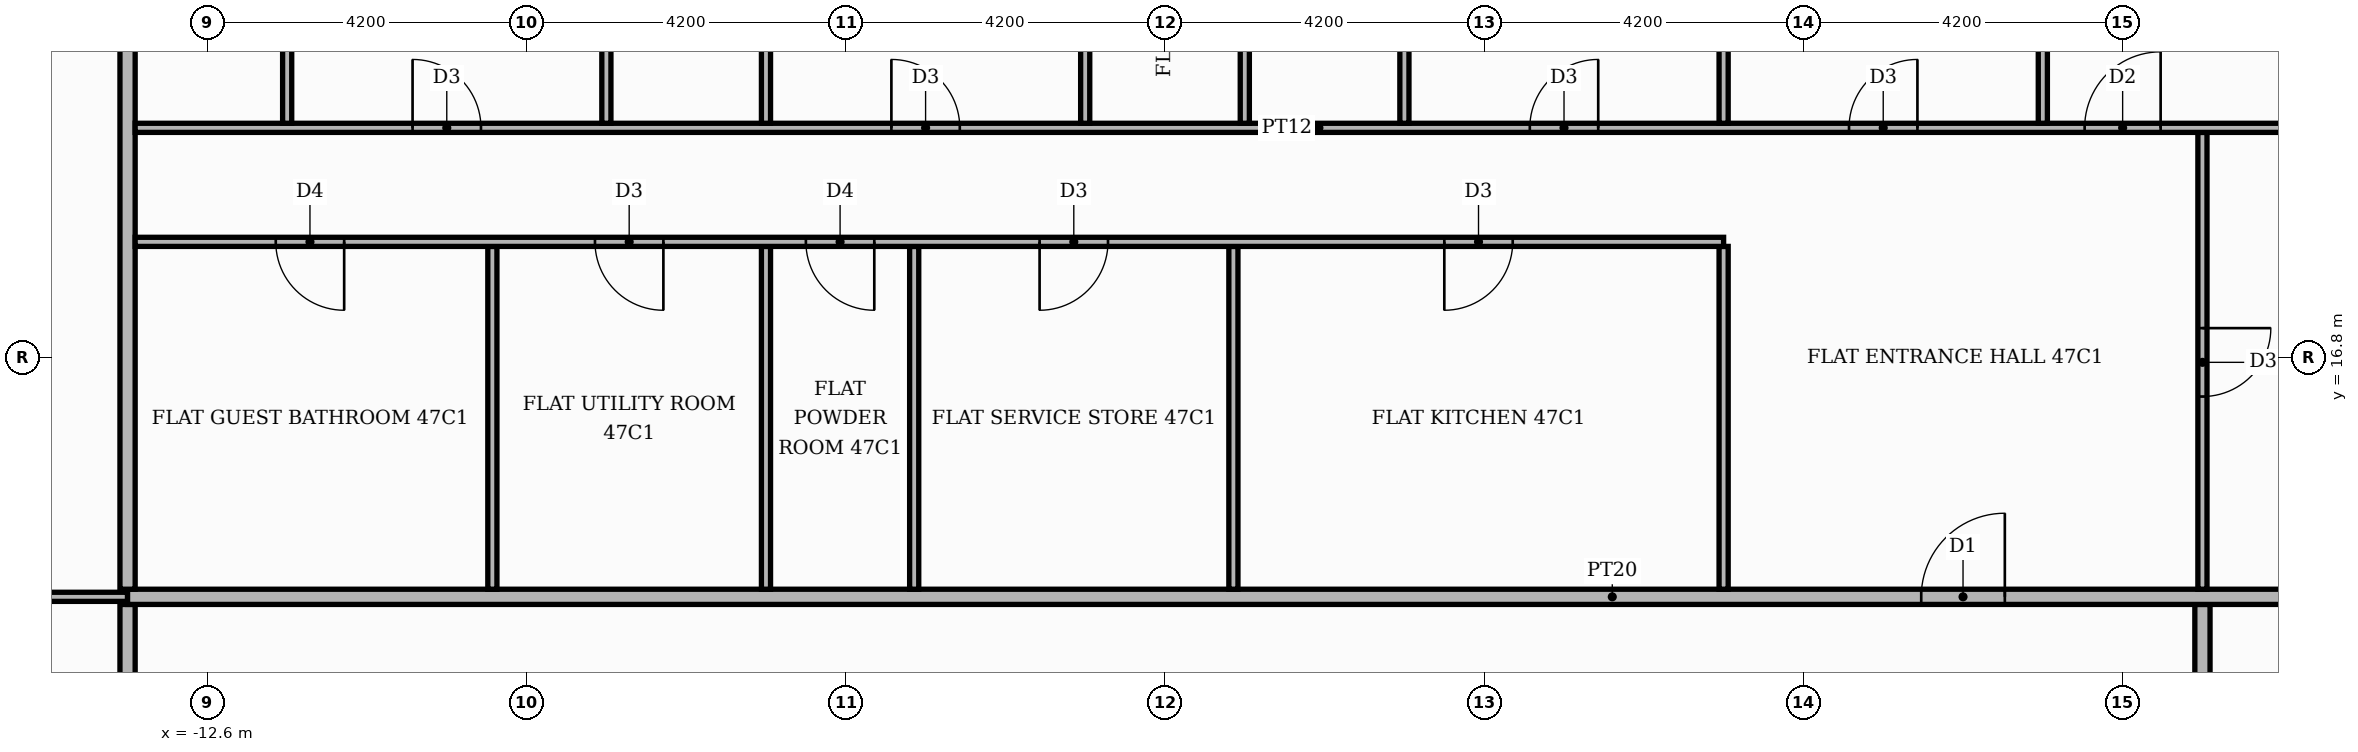
"""IFC4 building model, lengths in metres.
Left out: names, types, materials, properties, quantities, classifications, styles, units other than length and angle.
Written with IfcOpenShell. Run it as: python <this file> out.ifc"""

import sys

from ifc_helpers import new_model, si_unit, direction, frame, frame_2d, origin, place, context, subcontext, project, spatial, rectangle, extrude, element, fill, save


model = new_model("IFC4")
c1 = context("Model", 3, precision=1e-05, world=origin(), true_north=direction((0.0, 1.0)))
c2 = subcontext(c1, "Body", "Model", "MODEL_VIEW")
j1 = project(units=[si_unit("LENGTHUNIT", "METRE"), si_unit("PLANEANGLEUNIT", "RADIAN")], contexts=[c1])
p1 = place(None, origin())
s1 = spatial("IfcSite", under=j1, at=p1, CompositionType="ELEMENT")
p2 = place(p1, origin())
s2 = spatial("IfcBuilding", under=s1, at=p2, CompositionType="ELEMENT")
p3 = place(p2, frame((0.0, 0.0, 200.1)))
s3 = spatial("IfcBuildingStorey", under=s2, at=p3, CompositionType="ELEMENT", Elevation=200.1)
p4 = place(p3, frame((-13.65, -13.55, 0.0), z_axis=(0.0, 0.0, 1.0), x_axis=(0.0, 1.0, 0.0)))
e1 = element("IfcWall", 1, at=p4, inside=s3, PredefinedType="PARTITIONING", context=c2, shape_type="SweptSolid", body=[
    extrude(rectangle(XDim=27.1, YDim=0.2, at=frame_2d((13.55, 0.0))), origin(), (0.0, 0.0, 1.0), 3.48),
])
p5 = place(p4, frame((23.5, 0.0, 0.0)))
e2 = element("IfcOpeningElement", 2, at=p5, cuts=e1, PredefinedType="OPENING", context=c2, shape_type="SweptSolid", body=[
    extrude(rectangle(XDim=1.1, YDim=2.4, at=frame_2d((0.55, 1.2))), frame((0.0, 0.11, 0.0), z_axis=(0.0, -1.0, 0.0), x_axis=(1.0, 0.0, 0.0)), (0.0, 0.0, 1.0), 0.22),
])
p6 = place(p3, frame((13.65, 11.1, 0.0), z_axis=(0.0, 0.0, 1.0), x_axis=(0.0, 1.0, 0.0)))
e3 = element("IfcWall", 3, at=p6, inside=s3, PredefinedType="PARTITIONING", context=c2, shape_type="SweptSolid", body=[
    extrude(rectangle(XDim=2.45, YDim=0.2, at=frame_2d((1.225, 0.0))), origin(), (0.0, 0.0, 1.0), 3.48),
])
p7 = place(p3, frame((-20.12, 13.65, 0.0), z_axis=(0.0, 0.0, 1.0), x_axis=(1.0, 0.0, 0.0)))
e4 = element("IfcWall", 4, at=p7, inside=s3, PredefinedType="PARTITIONING", context=c2, shape_type="SweptSolid", body=[
    extrude(rectangle(XDim=6.47, YDim=0.12, at=frame_2d((3.235, 0.0))), origin(), (0.0, 0.0, 1.0), 3.48),
])
p8 = place(p7, frame((2.785, 0.0, 0.0)))
e5 = element("IfcOpeningElement", 5, at=p8, cuts=e4, PredefinedType="OPENING", context=c2, shape_type="SweptSolid", body=[
    extrude(rectangle(XDim=0.9, YDim=2.1, at=frame_2d((0.45, 1.05))), frame((0.0, 0.07, 0.0), z_axis=(0.0, -1.0, 0.0), x_axis=(1.0, 0.0, 0.0)), (0.0, 0.0, 1.0), 0.14),
])
p9 = place(p3, frame((-13.65, 13.65, 0.0), z_axis=(0.0, 0.0, 1.0), x_axis=(1.0, 0.0, 0.0)))
e6 = element("IfcWall", 6, at=p9, inside=s3, PredefinedType="PARTITIONING", context=c2, shape_type="SweptSolid", body=[
    extrude(rectangle(XDim=39.07, YDim=0.2, at=frame_2d((19.535, 0.0))), origin(), (0.0, 0.0, 1.0), 3.48),
])
p10 = place(p9, frame((23.6, 0.0, 0.0)))
e7 = element("IfcOpeningElement", 7, at=p10, cuts=e6, PredefinedType="OPENING", context=c2, shape_type="SweptSolid", body=[
    extrude(rectangle(XDim=1.1, YDim=2.4, at=frame_2d((0.55, 1.2))), frame((0.0, 0.11, 0.0), z_axis=(0.0, -1.0, 0.0), x_axis=(1.0, 0.0, 0.0)), (0.0, 0.0, 1.0), 0.22),
])
p11 = place(p3, frame((-13.65, 13.75, 0.0), z_axis=(0.0, 0.0, 1.0), x_axis=(0.0, 1.0, 0.0)))
e8 = element("IfcWall", 8, at=p11, inside=s3, PredefinedType="PARTITIONING", context=c2, shape_type="SweptSolid", body=[
    extrude(rectangle(XDim=11.67, YDim=0.2, at=frame_2d((5.835, 0.0))), origin(), (0.0, 0.0, 1.0), 3.48),
])
for number, where, z_axis, x_axis in (
    (9, (-8.85, 13.75, 0.0), (0.0, 0.0, 1.0), (0.0, 1.0, 0.0)),
    (10, (-5.25, 13.75, 0.0), (0.0, 0.0, 1.0), (0.0, 1.0, 0.0)),
    (11, (-3.3, 13.75, 0.0), (0.0, 0.0, 1.0), (0.0, 1.0, 0.0)),
    (12, (0.9, 13.75, 0.0), (0.0, 0.0, 1.0), (0.0, 1.0, 0.0)),
    (13, (7.35, 13.75, 0.0), (0.0, 0.0, 1.0), (0.0, 1.0, 0.0)),
):
    element("IfcWall", number, at=place(p3, frame(where, z_axis=z_axis, x_axis=x_axis)), inside=s3, PredefinedType="PARTITIONING", context=c2, shape_type="SweptSolid", body=[
        extrude(rectangle(XDim=4.51, YDim=0.12, at=frame_2d((2.255, 0.0))), origin(), (0.0, 0.0, 1.0), 3.48),
    ])
p12 = place(p3, frame((13.65, 13.75, 0.0), z_axis=(0.0, 0.0, 1.0), x_axis=(0.0, 1.0, 0.0)))
e14 = element("IfcWall", 14, at=p12, inside=s3, PredefinedType="PARTITIONING", context=c2, shape_type="SweptSolid", body=[
    extrude(rectangle(XDim=6.01, YDim=0.12, at=frame_2d((3.005, 0.0))), origin(), (0.0, 0.0, 1.0), 3.48),
])
p13 = place(p12, frame((2.535, 0.0, 0.0)))
e15 = element("IfcOpeningElement", 15, at=p13, cuts=e14, PredefinedType="OPENING", context=c2, shape_type="SweptSolid", body=[
    extrude(rectangle(XDim=0.9, YDim=2.1, at=frame_2d((0.45, 1.05))), frame((0.0, 0.07, 0.0), z_axis=(0.0, -1.0, 0.0), x_axis=(1.0, 0.0, 0.0)), (0.0, 0.0, 1.0), 0.14),
])
p14 = place(p3, frame((-13.55, 18.32, 0.0), z_axis=(0.0, 0.0, 1.0), x_axis=(1.0, 0.0, 0.0)))
e16 = element("IfcWall", 16, at=p14, inside=s3, PredefinedType="PARTITIONING", context=c2, shape_type="SweptSolid", body=[
    extrude(rectangle(XDim=20.9, YDim=0.12, at=frame_2d((10.45, 0.0))), origin(), (0.0, 0.0, 1.0), 3.48),
])
p15 = place(p14, frame((17.225, 0.0, 0.0)))
e17 = element("IfcOpeningElement", 17, at=p15, cuts=e16, PredefinedType="OPENING", context=c2, shape_type="SweptSolid", body=[
    extrude(rectangle(XDim=0.9, YDim=2.1, at=frame_2d((0.45, 1.05))), frame((0.0, 0.07, 0.0), z_axis=(0.0, -1.0, 0.0), x_axis=(1.0, 0.0, 0.0)), (0.0, 0.0, 1.0), 0.14),
])
p16 = place(p14, frame((11.9, 0.0, 0.0)))
e18 = element("IfcOpeningElement", 18, at=p16, cuts=e16, PredefinedType="OPENING", context=c2, shape_type="SweptSolid", body=[
    extrude(rectangle(XDim=0.9, YDim=2.1, at=frame_2d((0.45, 1.05))), frame((0.0, 0.07, 0.0), z_axis=(0.0, -1.0, 0.0), x_axis=(1.0, 0.0, 0.0)), (0.0, 0.0, 1.0), 0.14),
])
p17 = place(p14, frame((8.825, 0.0, 0.0)))
e19 = element("IfcOpeningElement", 19, at=p17, cuts=e16, PredefinedType="OPENING", context=c2, shape_type="SweptSolid", body=[
    extrude(rectangle(XDim=0.9, YDim=2.1, at=frame_2d((0.45, 1.05))), frame((0.0, 0.07, 0.0), z_axis=(0.0, -1.0, 0.0), x_axis=(1.0, 0.0, 0.0)), (0.0, 0.0, 1.0), 0.14),
])
p18 = place(p14, frame((6.05, 0.0, 0.0)))
e20 = element("IfcOpeningElement", 20, at=p18, cuts=e16, PredefinedType="OPENING", context=c2, shape_type="SweptSolid", body=[
    extrude(rectangle(XDim=0.9, YDim=2.1, at=frame_2d((0.45, 1.05))), frame((0.0, 0.07, 0.0), z_axis=(0.0, -1.0, 0.0), x_axis=(1.0, 0.0, 0.0)), (0.0, 0.0, 1.0), 0.14),
])
p19 = place(p14, frame((1.85, 0.0, 0.0)))
e21 = element("IfcOpeningElement", 21, at=p19, cuts=e16, PredefinedType="OPENING", context=c2, shape_type="SweptSolid", body=[
    extrude(rectangle(XDim=0.9, YDim=2.1, at=frame_2d((0.45, 1.05))), frame((0.0, 0.07, 0.0), z_axis=(0.0, -1.0, 0.0), x_axis=(1.0, 0.0, 0.0)), (0.0, 0.0, 1.0), 0.14),
])
p20 = place(p3, frame((-13.55, 19.82, 0.0), z_axis=(0.0, 0.0, 1.0), x_axis=(1.0, 0.0, 0.0)))
e22 = element("IfcWall", 22, at=p20, inside=s3, PredefinedType="PARTITIONING", context=c2, shape_type="SweptSolid", body=[
    extrude(rectangle(XDim=31.15, YDim=0.12, at=frame_2d((15.575, 0.0))), origin(), (0.0, 0.0, 1.0), 3.48),
])
p21 = place(p20, frame((25.65, 0.0, 0.0)))
e23 = element("IfcOpeningElement", 23, at=p21, cuts=e22, PredefinedType="OPENING", context=c2, shape_type="SweptSolid", body=[
    extrude(rectangle(XDim=1.0, YDim=2.1, at=frame_2d((0.5, 1.05))), frame((0.0, 0.07, 0.0), z_axis=(0.0, -1.0, 0.0), x_axis=(1.0, 0.0, 0.0)), (0.0, 0.0, 1.0), 0.14),
])
p22 = place(p20, frame((22.55, 0.0, 0.0)))
e24 = element("IfcOpeningElement", 24, at=p22, cuts=e22, PredefinedType="OPENING", context=c2, shape_type="SweptSolid", body=[
    extrude(rectangle(XDim=0.9, YDim=2.1, at=frame_2d((0.45, 1.05))), frame((0.0, 0.07, 0.0), z_axis=(0.0, -1.0, 0.0), x_axis=(1.0, 0.0, 0.0)), (0.0, 0.0, 1.0), 0.14),
])
p23 = place(p20, frame((18.35, 0.0, 0.0)))
e25 = element("IfcOpeningElement", 25, at=p23, cuts=e22, PredefinedType="OPENING", context=c2, shape_type="SweptSolid", body=[
    extrude(rectangle(XDim=0.9, YDim=2.1, at=frame_2d((0.45, 1.05))), frame((0.0, 0.07, 0.0), z_axis=(0.0, -1.0, 0.0), x_axis=(1.0, 0.0, 0.0)), (0.0, 0.0, 1.0), 0.14),
])
p24 = place(p20, frame((9.95, 0.0, 0.0)))
e26 = element("IfcOpeningElement", 26, at=p24, cuts=e22, PredefinedType="OPENING", context=c2, shape_type="SweptSolid", body=[
    extrude(rectangle(XDim=0.9, YDim=2.1, at=frame_2d((0.45, 1.05))), frame((0.0, 0.07, 0.0), z_axis=(0.0, -1.0, 0.0), x_axis=(1.0, 0.0, 0.0)), (0.0, 0.0, 1.0), 0.14),
])
p25 = place(p20, frame((3.65, 0.0, 0.0)))
e27 = element("IfcOpeningElement", 27, at=p25, cuts=e22, PredefinedType="OPENING", context=c2, shape_type="SweptSolid", body=[
    extrude(rectangle(XDim=0.9, YDim=2.1, at=frame_2d((0.45, 1.05))), frame((0.0, 0.07, 0.0), z_axis=(0.0, -1.0, 0.0), x_axis=(1.0, 0.0, 0.0)), (0.0, 0.0, 1.0), 0.14),
])
p26 = place(p3, frame((-11.55, 19.88, 0.0), z_axis=(0.0, 0.0, 1.0), x_axis=(0.0, 1.0, 0.0)))
e28 = element("IfcWall", 28, at=p26, inside=s3, PredefinedType="PARTITIONING", context=c2, shape_type="SweptSolid", body=[
    extrude(rectangle(XDim=5.54, YDim=0.12, at=frame_2d((2.77, 0.0))), origin(), (0.0, 0.0, 1.0), 3.48),
])
p27 = place(p26, frame((2.44, 0.0, 0.0)))
e29 = element("IfcOpeningElement", 29, at=p27, cuts=e28, PredefinedType="OPENING", context=c2, shape_type="SweptSolid", body=[
    extrude(rectangle(XDim=0.9, YDim=2.1, at=frame_2d((0.45, 1.05))), frame((0.0, 0.07, 0.0), z_axis=(0.0, -1.0, 0.0), x_axis=(1.0, 0.0, 0.0)), (0.0, 0.0, 1.0), 0.14),
])
p28 = place(p3, frame((-7.35, 19.88, 0.0), z_axis=(0.0, 0.0, 1.0), x_axis=(0.0, 1.0, 0.0)))
e30 = element("IfcWall", 30, at=p28, inside=s3, PredefinedType="PARTITIONING", context=c2, shape_type="SweptSolid", body=[
    extrude(rectangle(XDim=5.54, YDim=0.12, at=frame_2d((2.77, 0.0))), origin(), (0.0, 0.0, 1.0), 3.48),
])
p29 = place(p3, frame((-5.25, 19.88, 0.0), z_axis=(0.0, 0.0, 1.0), x_axis=(0.0, 1.0, 0.0)))
e31 = element("IfcWall", 31, at=p29, inside=s3, PredefinedType="PARTITIONING", context=c2, shape_type="SweptSolid", body=[
    extrude(rectangle(XDim=5.54, YDim=0.12, at=frame_2d((2.77, 0.0))), origin(), (0.0, 0.0, 1.0), 3.48),
])
p30 = place(p29, frame((2.44, 0.0, 0.0)))
e32 = element("IfcOpeningElement", 32, at=p30, cuts=e31, PredefinedType="OPENING", context=c2, shape_type="SweptSolid", body=[
    extrude(rectangle(XDim=0.9, YDim=2.1, at=frame_2d((0.45, 1.05))), frame((0.0, 0.07, 0.0), z_axis=(0.0, -1.0, 0.0), x_axis=(1.0, 0.0, 0.0)), (0.0, 0.0, 1.0), 0.14),
])
p31 = place(p3, frame((-1.05, 19.88, 0.0), z_axis=(0.0, 0.0, 1.0), x_axis=(0.0, 1.0, 0.0)))
e33 = element("IfcWall", 33, at=p31, inside=s3, PredefinedType="PARTITIONING", context=c2, shape_type="SweptSolid", body=[
    extrude(rectangle(XDim=5.54, YDim=0.12, at=frame_2d((2.77, 0.0))), origin(), (0.0, 0.0, 1.0), 3.48),
])
p32 = place(p3, frame((1.05, 19.88, 0.0), z_axis=(0.0, 0.0, 1.0), x_axis=(0.0, 1.0, 0.0)))
e34 = element("IfcWall", 34, at=p32, inside=s3, PredefinedType="PARTITIONING", context=c2, shape_type="SweptSolid", body=[
    extrude(rectangle(XDim=5.54, YDim=0.12, at=frame_2d((2.77, 0.0))), origin(), (0.0, 0.0, 1.0), 3.48),
])
p33 = place(p32, frame((2.44, 0.0, 0.0)))
e35 = element("IfcOpeningElement", 35, at=p33, cuts=e34, PredefinedType="OPENING", context=c2, shape_type="SweptSolid", body=[
    extrude(rectangle(XDim=0.9, YDim=2.1, at=frame_2d((0.45, 1.05))), frame((0.0, 0.07, 0.0), z_axis=(0.0, -1.0, 0.0), x_axis=(1.0, 0.0, 0.0)), (0.0, 0.0, 1.0), 0.14),
])
p34 = place(p3, frame((3.15, 19.88, 0.0), z_axis=(0.0, 0.0, 1.0), x_axis=(0.0, 1.0, 0.0)))
e36 = element("IfcWall", 36, at=p34, inside=s3, PredefinedType="PARTITIONING", context=c2, shape_type="SweptSolid", body=[
    extrude(rectangle(XDim=5.54, YDim=0.12, at=frame_2d((2.77, 0.0))), origin(), (0.0, 0.0, 1.0), 3.48),
])
p35 = place(p34, frame((2.44, 0.0, 0.0)))
e37 = element("IfcOpeningElement", 37, at=p35, cuts=e36, PredefinedType="OPENING", context=c2, shape_type="SweptSolid", body=[
    extrude(rectangle(XDim=0.9, YDim=2.1, at=frame_2d((0.45, 1.05))), frame((0.0, 0.07, 0.0), z_axis=(0.0, -1.0, 0.0), x_axis=(1.0, 0.0, 0.0)), (0.0, 0.0, 1.0), 0.14),
])
for number, where, z_axis, x_axis in (
    (38, (7.35, 19.88, 0.0), (0.0, 0.0, 1.0), (0.0, 1.0, 0.0)),
    (39, (11.55, 19.88, 0.0), (0.0, 0.0, 1.0), (0.0, 1.0, 0.0)),
):
    element("IfcWall", number, at=place(p3, frame(where, z_axis=z_axis, x_axis=x_axis)), inside=s3, PredefinedType="PARTITIONING", context=c2, shape_type="SweptSolid", body=[
        extrude(rectangle(XDim=5.54, YDim=0.12, at=frame_2d((2.77, 0.0))), origin(), (0.0, 0.0, 1.0), 3.48),
    ])
p36 = place(p10, origin())
e40 = element("IfcDoor", 40, at=p36, inside=s3, OperationType="SINGLE_SWING_RIGHT", PredefinedType="DOOR", context=c2, shape_type="SweptSolid", body=[
    extrude(rectangle(XDim=1.1, YDim=2.4, at=frame_2d((0.55, 1.2))), frame((0.0, 0.025, 0.0), z_axis=(0.0, -1.0, 0.0), x_axis=(1.0, 0.0, 0.0)), (0.0, 0.0, 1.0), 0.05),
])
fill(e7, e40)
p37 = place(p13, frame((0.9, 0.0, 0.0), z_axis=(0.0, 0.0, 1.0), x_axis=(-1.0, 0.0, 0.0)))
e41 = element("IfcDoor", 41, at=p37, inside=s3, OperationType="SINGLE_SWING_RIGHT", PredefinedType="DOOR", context=c2, shape_type="SweptSolid", body=[
    extrude(rectangle(XDim=0.9, YDim=2.1, at=frame_2d((0.45, 1.05))), frame((0.0, 0.025, 0.0), z_axis=(0.0, -1.0, 0.0), x_axis=(1.0, 0.0, 0.0)), (0.0, 0.0, 1.0), 0.05),
])
fill(e15, e41)
p38 = place(p15, frame((0.9, 0.0, 0.0), z_axis=(0.0, 0.0, 1.0), x_axis=(-1.0, 0.0, 0.0)))
e42 = element("IfcDoor", 42, at=p38, inside=s3, OperationType="SINGLE_SWING_LEFT", PredefinedType="DOOR", context=c2, shape_type="SweptSolid", body=[
    extrude(rectangle(XDim=0.9, YDim=2.1, at=frame_2d((0.45, 1.05))), frame((0.0, 0.025, 0.0), z_axis=(0.0, -1.0, 0.0), x_axis=(1.0, 0.0, 0.0)), (0.0, 0.0, 1.0), 0.05),
])
fill(e17, e42)
p39 = place(p16, frame((0.9, 0.0, 0.0), z_axis=(0.0, 0.0, 1.0), x_axis=(-1.0, 0.0, 0.0)))
e43 = element("IfcDoor", 43, at=p39, inside=s3, OperationType="SINGLE_SWING_LEFT", PredefinedType="DOOR", context=c2, shape_type="SweptSolid", body=[
    extrude(rectangle(XDim=0.9, YDim=2.1, at=frame_2d((0.45, 1.05))), frame((0.0, 0.025, 0.0), z_axis=(0.0, -1.0, 0.0), x_axis=(1.0, 0.0, 0.0)), (0.0, 0.0, 1.0), 0.05),
])
fill(e18, e43)
p40 = place(p17, frame((0.9, 0.0, 0.0), z_axis=(0.0, 0.0, 1.0), x_axis=(-1.0, 0.0, 0.0)))
e44 = element("IfcDoor", 44, at=p40, inside=s3, OperationType="SINGLE_SWING_RIGHT", PredefinedType="DOOR", context=c2, shape_type="SweptSolid", body=[
    extrude(rectangle(XDim=0.9, YDim=2.1, at=frame_2d((0.45, 1.05))), frame((0.0, 0.025, 0.0), z_axis=(0.0, -1.0, 0.0), x_axis=(1.0, 0.0, 0.0)), (0.0, 0.0, 1.0), 0.05),
])
fill(e19, e44)
p41 = place(p18, frame((0.9, 0.0, 0.0), z_axis=(0.0, 0.0, 1.0), x_axis=(-1.0, 0.0, 0.0)))
e45 = element("IfcDoor", 45, at=p41, inside=s3, OperationType="SINGLE_SWING_RIGHT", PredefinedType="DOOR", context=c2, shape_type="SweptSolid", body=[
    extrude(rectangle(XDim=0.9, YDim=2.1, at=frame_2d((0.45, 1.05))), frame((0.0, 0.025, 0.0), z_axis=(0.0, -1.0, 0.0), x_axis=(1.0, 0.0, 0.0)), (0.0, 0.0, 1.0), 0.05),
])
fill(e20, e45)
p42 = place(p19, frame((0.9, 0.0, 0.0), z_axis=(0.0, 0.0, 1.0), x_axis=(-1.0, 0.0, 0.0)))
e46 = element("IfcDoor", 46, at=p42, inside=s3, OperationType="SINGLE_SWING_RIGHT", PredefinedType="DOOR", context=c2, shape_type="SweptSolid", body=[
    extrude(rectangle(XDim=0.9, YDim=2.1, at=frame_2d((0.45, 1.05))), frame((0.0, 0.025, 0.0), z_axis=(0.0, -1.0, 0.0), x_axis=(1.0, 0.0, 0.0)), (0.0, 0.0, 1.0), 0.05),
])
fill(e21, e46)
p43 = place(p21, origin())
e47 = element("IfcDoor", 47, at=p43, inside=s3, OperationType="SINGLE_SWING_RIGHT", PredefinedType="DOOR", context=c2, shape_type="SweptSolid", body=[
    extrude(rectangle(XDim=1.0, YDim=2.1, at=frame_2d((0.5, 1.05))), frame((0.0, 0.025, 0.0), z_axis=(0.0, -1.0, 0.0), x_axis=(1.0, 0.0, 0.0)), (0.0, 0.0, 1.0), 0.05),
])
fill(e23, e47)
p44 = place(p22, origin())
e48 = element("IfcDoor", 48, at=p44, inside=s3, OperationType="SINGLE_SWING_RIGHT", PredefinedType="DOOR", context=c2, shape_type="SweptSolid", body=[
    extrude(rectangle(XDim=0.9, YDim=2.1, at=frame_2d((0.45, 1.05))), frame((0.0, 0.025, 0.0), z_axis=(0.0, -1.0, 0.0), x_axis=(1.0, 0.0, 0.0)), (0.0, 0.0, 1.0), 0.05),
])
fill(e24, e48)
p45 = place(p23, origin())
e49 = element("IfcDoor", 49, at=p45, inside=s3, OperationType="SINGLE_SWING_RIGHT", PredefinedType="DOOR", context=c2, shape_type="SweptSolid", body=[
    extrude(rectangle(XDim=0.9, YDim=2.1, at=frame_2d((0.45, 1.05))), frame((0.0, 0.025, 0.0), z_axis=(0.0, -1.0, 0.0), x_axis=(1.0, 0.0, 0.0)), (0.0, 0.0, 1.0), 0.05),
])
fill(e25, e49)
p46 = place(p24, origin())
e50 = element("IfcDoor", 50, at=p46, inside=s3, OperationType="SINGLE_SWING_LEFT", PredefinedType="DOOR", context=c2, shape_type="SweptSolid", body=[
    extrude(rectangle(XDim=0.9, YDim=2.1, at=frame_2d((0.45, 1.05))), frame((0.0, 0.025, 0.0), z_axis=(0.0, -1.0, 0.0), x_axis=(1.0, 0.0, 0.0)), (0.0, 0.0, 1.0), 0.05),
])
fill(e26, e50)
p47 = place(p25, origin())
e51 = element("IfcDoor", 51, at=p47, inside=s3, OperationType="SINGLE_SWING_LEFT", PredefinedType="DOOR", context=c2, shape_type="SweptSolid", body=[
    extrude(rectangle(XDim=0.9, YDim=2.1, at=frame_2d((0.45, 1.05))), frame((0.0, 0.025, 0.0), z_axis=(0.0, -1.0, 0.0), x_axis=(1.0, 0.0, 0.0)), (0.0, 0.0, 1.0), 0.05),
])
fill(e27, e51)
save(model, sys.argv[1])
